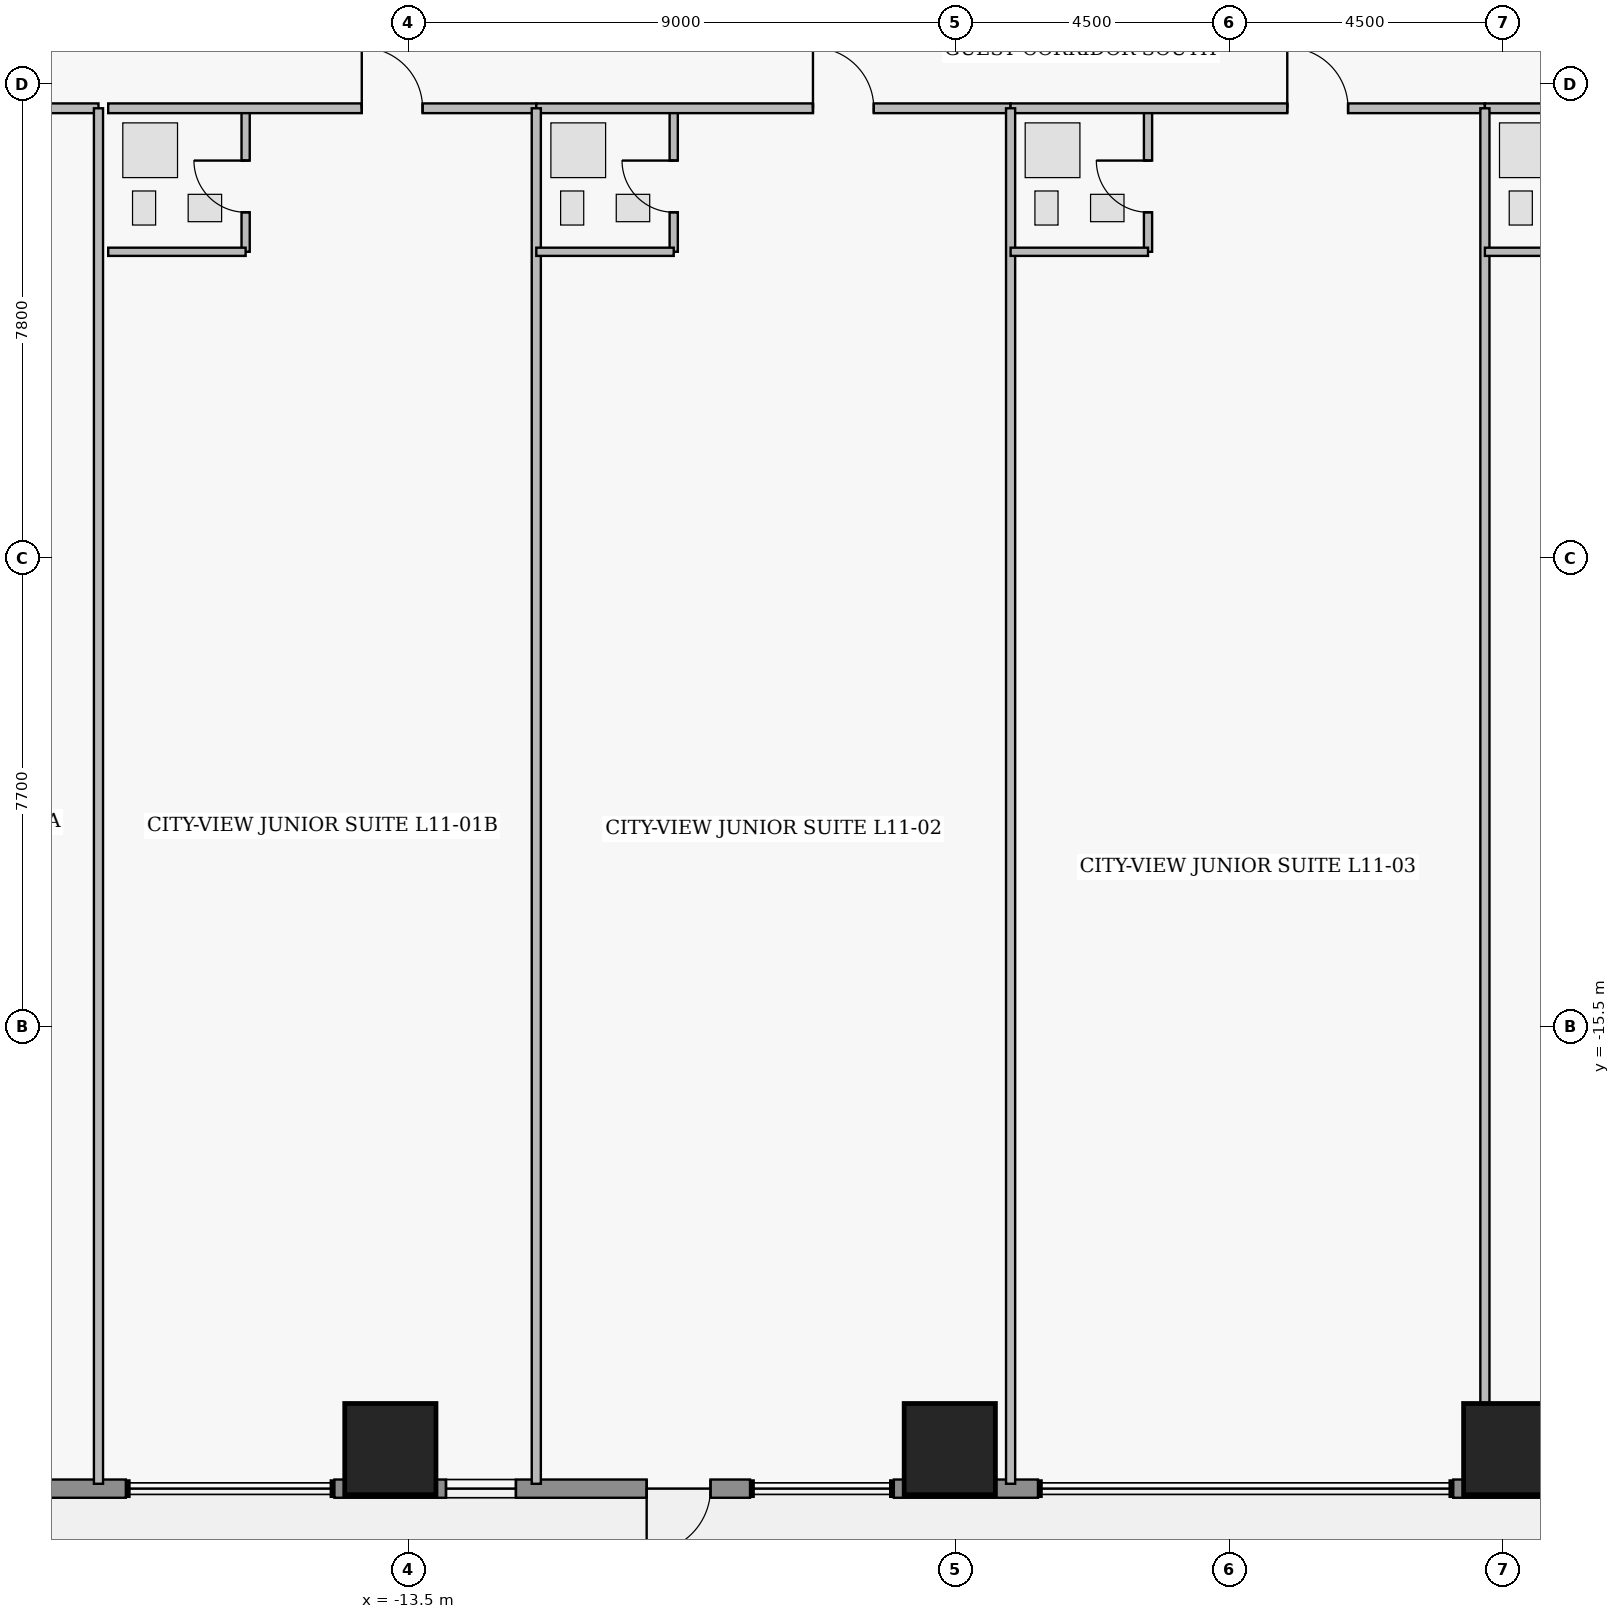
"""IFC4 building model, lengths in metres.
Left out: names, types, materials, properties, quantities, classifications, styles, units other than length and angle.
Written with IfcOpenShell. Run it as: python <this file> out.ifc"""

import sys

from ifc_helpers import new_model, si_unit, direction, frame, frame_2d, origin, origin_2d, place, context, subcontext, project, spatial, rectangle, extrude, element, fill, save


model = new_model("IFC4")
c1 = context("Model", 3, precision=1e-05, world=origin(), true_north=direction((0.0, 1.0)))
c2 = subcontext(c1, "Body", "Model", "MODEL_VIEW")
j1 = project(units=[si_unit("LENGTHUNIT", "METRE"), si_unit("PLANEANGLEUNIT", "RADIAN")], contexts=[c1])
p1 = place(None, origin())
s1 = spatial("IfcSite", under=j1, at=p1, CompositionType="ELEMENT")
p2 = place(p1, origin())
s2 = spatial("IfcBuilding", under=s1, at=p2, CompositionType="ELEMENT")
p3 = place(p2, frame((0.0, 0.0, 49.5)))
s3 = spatial("IfcBuildingStorey", under=s2, at=p3, CompositionType="ELEMENT", Elevation=49.5)
for number, where, z_axis, x_axis in (
    (1, (-13.8, -22.45, 0.0), (0.0, 0.0, 1.0), (1.0, 0.0, 0.0)),
    (2, (-4.6, -22.45, 0.0), (0.0, 0.0, 1.0), (1.0, 0.0, 0.0)),
    (3, (4.6, -22.45, 0.0), (0.0, 0.0, 1.0), (1.0, 0.0, 0.0)),
):
    element("IfcColumn", number, at=place(p3, frame(where, z_axis=z_axis, x_axis=x_axis)), inside=s3, PredefinedType="COLUMN", context=c2, shape_type="SweptSolid", body=[
        extrude(rectangle(XDim=1.5, YDim=1.5, at=origin_2d()), origin(), (0.0, 0.0, 1.0), 3.65),
    ])
p4 = place(p3, frame((5.52, -23.1, 0.0), z_axis=(0.0, 0.0, 1.0), x_axis=(-1.0, 0.0, 0.0)))
e4 = element("IfcWall", 4, at=p4, inside=s3, PredefinedType="STANDARD", context=c2, shape_type="SweptSolid", body=[
    extrude(rectangle(XDim=1.84, YDim=0.3, at=frame_2d((0.92, 0.0))), origin(), (0.0, 0.0, 1.0), 3.43),
])
p5 = place(p3, frame((-3.15, -23.1, 0.0), z_axis=(0.0, 0.0, 1.0), x_axis=(-1.0, 0.0, 0.0)))
e5 = element("IfcWall", 5, at=p5, inside=s3, PredefinedType="STANDARD", context=c2, shape_type="SweptSolid", body=[
    extrude(rectangle(XDim=2.37, YDim=0.3, at=frame_2d((1.185, 0.0))), origin(), (0.0, 0.0, 1.0), 3.43),
])
p6 = place(p3, frame((-7.885, -23.1, 0.0), z_axis=(0.0, 0.0, 1.0), x_axis=(-1.0, 0.0, 0.0)))
e6 = element("IfcWall", 6, at=p6, inside=s3, PredefinedType="STANDARD", context=c2, shape_type="SweptSolid", body=[
    extrude(rectangle(XDim=6.835, YDim=0.3, at=frame_2d((3.417, 0.0))), origin(), (0.0, 0.0, 1.0), 3.43),
])
p7 = place(p6, frame((0.65, 0.0, 0.0)))
e7 = element("IfcOpeningElement", 7, at=p7, cuts=e6, PredefinedType="OPENING", context=c2, shape_type="SweptSolid", body=[
    extrude(rectangle(XDim=1.05, YDim=2.2, at=frame_2d((0.525, 1.1))), frame((0.0, 0.16, 0.0), z_axis=(0.0, -1.0, 0.0), x_axis=(1.0, 0.0, 0.0)), (0.0, 0.0, 1.0), 0.32),
])
p8 = place(p6, frame((3.85, 0.0, 0.95)))
e8 = element("IfcOpeningElement", 8, at=p8, cuts=e6, PredefinedType="OPENING", context=c2, shape_type="SweptSolid", body=[
    extrude(rectangle(XDim=1.15, YDim=1.55, at=frame_2d((0.575, 0.775))), frame((0.0, 0.16, 0.0), z_axis=(0.0, -1.0, 0.0), x_axis=(1.0, 0.0, 0.0)), (0.0, 0.0, 1.0), 0.32),
])
p9 = place(p3, frame((-18.15, -23.1, 0.0), z_axis=(0.0, 0.0, 1.0), x_axis=(-1.0, 0.0, 0.0)))
e9 = element("IfcWall", 9, at=p9, inside=s3, PredefinedType="STANDARD", context=c2, shape_type="SweptSolid", body=[
    extrude(rectangle(XDim=3.95, YDim=0.3, at=frame_2d((1.975, 0.0))), origin(), (0.0, 0.0, 1.0), 3.43),
])
p10 = place(p9, frame((1.34, 0.0, 0.85)))
e10 = element("IfcOpeningElement", 10, at=p10, cuts=e9, PredefinedType="OPENING", context=c2, shape_type="SweptSolid", body=[
    extrude(rectangle(XDim=1.6, YDim=1.8, at=frame_2d((0.8, 0.9))), frame((0.0, 0.16, 0.0), z_axis=(0.0, -1.0, 0.0), x_axis=(1.0, 0.0, 0.0)), (0.0, 0.0, 1.0), 0.32),
])
p11 = place(p3, frame((-25.64, -0.4, 0.0), z_axis=(0.0, 0.0, 1.0), x_axis=(1.0, 0.0, 0.0)))
e11 = element("IfcWall", 11, at=p11, inside=s3, PredefinedType="PARTITIONING", context=c2, shape_type="SweptSolid", body=[
    extrude(rectangle(XDim=7.04, YDim=0.16, at=frame_2d((3.52, 0.0))), origin(), (0.0, 0.0, 1.0), 3.43),
])
p12 = place(p11, frame((4.17, 0.0, 0.0)))
e12 = element("IfcOpeningElement", 12, at=p12, cuts=e11, PredefinedType="OPENING", context=c2, shape_type="SweptSolid", body=[
    extrude(rectangle(XDim=1.0, YDim=2.15, at=frame_2d((0.5, 1.075))), frame((0.0, 0.09, 0.0), z_axis=(0.0, -1.0, 0.0), x_axis=(1.0, 0.0, 0.0)), (0.0, 0.0, 1.0), 0.18),
])
p13 = place(p3, frame((-16.18, -2.76, 0.0), z_axis=(0.0, 0.0, 1.0), x_axis=(0.0, 1.0, 0.0)))
e13 = element("IfcWall", 13, at=p13, inside=s3, PredefinedType="PLUMBINGWALL", context=c2, shape_type="SweptSolid", body=[
    extrude(rectangle(XDim=2.36, YDim=0.135, at=frame_2d((1.18, 0.0))), origin(), (0.0, 0.0, 1.0), 3.43),
])
p14 = place(p13, frame((0.65, 0.0, 0.0)))
e14 = element("IfcOpeningElement", 14, at=p14, cuts=e13, PredefinedType="OPENING", context=c2, shape_type="SweptSolid", body=[
    extrude(rectangle(XDim=0.85, YDim=2.1, at=frame_2d((0.425, 1.05))), frame((0.0, 0.077, 0.0), z_axis=(0.0, -1.0, 0.0), x_axis=(1.0, 0.0, 0.0)), (0.0, 0.0, 1.0), 0.155),
])
p15 = place(p3, frame((-18.44, -0.4, 0.0), z_axis=(0.0, 0.0, 1.0), x_axis=(1.0, 0.0, 0.0)))
e15 = element("IfcWall", 15, at=p15, inside=s3, PredefinedType="PARTITIONING", context=c2, shape_type="SweptSolid", body=[
    extrude(rectangle(XDim=7.04, YDim=0.16, at=frame_2d((3.52, 0.0))), origin(), (0.0, 0.0, 1.0), 3.43),
])
p16 = place(p15, frame((4.17, 0.0, 0.0)))
e16 = element("IfcOpeningElement", 16, at=p16, cuts=e15, PredefinedType="OPENING", context=c2, shape_type="SweptSolid", body=[
    extrude(rectangle(XDim=1.0, YDim=2.15, at=frame_2d((0.5, 1.075))), frame((0.0, 0.09, 0.0), z_axis=(0.0, -1.0, 0.0), x_axis=(1.0, 0.0, 0.0)), (0.0, 0.0, 1.0), 0.18),
])
p17 = place(p3, frame((-9.14, -2.76, 0.0), z_axis=(0.0, 0.0, 1.0), x_axis=(0.0, 1.0, 0.0)))
e17 = element("IfcWall", 17, at=p17, inside=s3, PredefinedType="PLUMBINGWALL", context=c2, shape_type="SweptSolid", body=[
    extrude(rectangle(XDim=2.36, YDim=0.135, at=frame_2d((1.18, 0.0))), origin(), (0.0, 0.0, 1.0), 3.43),
])
p18 = place(p17, frame((0.65, 0.0, 0.0)))
e18 = element("IfcOpeningElement", 18, at=p18, cuts=e17, PredefinedType="OPENING", context=c2, shape_type="SweptSolid", body=[
    extrude(rectangle(XDim=0.85, YDim=2.1, at=frame_2d((0.425, 1.05))), frame((0.0, 0.077, 0.0), z_axis=(0.0, -1.0, 0.0), x_axis=(1.0, 0.0, 0.0)), (0.0, 0.0, 1.0), 0.155),
])
p19 = place(p3, frame((-11.4, -0.4, 0.0), z_axis=(0.0, 0.0, 1.0), x_axis=(1.0, 0.0, 0.0)))
e19 = element("IfcWall", 19, at=p19, inside=s3, PredefinedType="PARTITIONING", context=c2, shape_type="SweptSolid", body=[
    extrude(rectangle(XDim=7.8, YDim=0.16, at=frame_2d((3.9, 0.0))), origin(), (0.0, 0.0, 1.0), 3.43),
])
p20 = place(p19, frame((4.55, 0.0, 0.0)))
e20 = element("IfcOpeningElement", 20, at=p20, cuts=e19, PredefinedType="OPENING", context=c2, shape_type="SweptSolid", body=[
    extrude(rectangle(XDim=1.0, YDim=2.15, at=frame_2d((0.5, 1.075))), frame((0.0, 0.09, 0.0), z_axis=(0.0, -1.0, 0.0), x_axis=(1.0, 0.0, 0.0)), (0.0, 0.0, 1.0), 0.18),
])
p21 = place(p3, frame((-1.34, -2.76, 0.0), z_axis=(0.0, 0.0, 1.0), x_axis=(0.0, 1.0, 0.0)))
e21 = element("IfcWall", 21, at=p21, inside=s3, PredefinedType="PLUMBINGWALL", context=c2, shape_type="SweptSolid", body=[
    extrude(rectangle(XDim=2.36, YDim=0.135, at=frame_2d((1.18, 0.0))), origin(), (0.0, 0.0, 1.0), 3.43),
])
p22 = place(p21, frame((0.65, 0.0, 0.0)))
e22 = element("IfcOpeningElement", 22, at=p22, cuts=e21, PredefinedType="OPENING", context=c2, shape_type="SweptSolid", body=[
    extrude(rectangle(XDim=0.85, YDim=2.1, at=frame_2d((0.425, 1.05))), frame((0.0, 0.077, 0.0), z_axis=(0.0, -1.0, 0.0), x_axis=(1.0, 0.0, 0.0)), (0.0, 0.0, 1.0), 0.155),
])
p23 = place(p3, frame((-3.6, -0.4, 0.0), z_axis=(0.0, 0.0, 1.0), x_axis=(1.0, 0.0, 0.0)))
e23 = element("IfcWall", 23, at=p23, inside=s3, PredefinedType="PARTITIONING", context=c2, shape_type="SweptSolid", body=[
    extrude(rectangle(XDim=7.8, YDim=0.16, at=frame_2d((3.9, 0.0))), origin(), (0.0, 0.0, 1.0), 3.43),
])
p24 = place(p23, frame((4.55, 0.0, 0.0)))
e24 = element("IfcOpeningElement", 24, at=p24, cuts=e23, PredefinedType="OPENING", context=c2, shape_type="SweptSolid", body=[
    extrude(rectangle(XDim=1.0, YDim=2.15, at=frame_2d((0.5, 1.075))), frame((0.0, 0.09, 0.0), z_axis=(0.0, -1.0, 0.0), x_axis=(1.0, 0.0, 0.0)), (0.0, 0.0, 1.0), 0.18),
])
p25 = place(p3, frame((4.2, -0.4, 0.0), z_axis=(0.0, 0.0, 1.0), x_axis=(1.0, 0.0, 0.0)))
e25 = element("IfcWall", 25, at=p25, inside=s3, PredefinedType="PARTITIONING", context=c2, shape_type="SweptSolid", body=[
    extrude(rectangle(XDim=7.6, YDim=0.16, at=frame_2d((3.8, 0.0))), origin(), (0.0, 0.0, 1.0), 3.43),
])
p26 = place(p25, frame((4.45, 0.0, 0.0)))
e26 = element("IfcOpeningElement", 26, at=p26, cuts=e25, PredefinedType="OPENING", context=c2, shape_type="SweptSolid", body=[
    extrude(rectangle(XDim=1.0, YDim=2.15, at=frame_2d((0.5, 1.075))), frame((0.0, 0.09, 0.0), z_axis=(0.0, -1.0, 0.0), x_axis=(1.0, 0.0, 0.0)), (0.0, 0.0, 1.0), 0.18),
])
p27 = place(p3, frame((-18.6, -23.02, 0.0), z_axis=(0.0, 0.0, 1.0), x_axis=(0.0, 1.0, 0.0)))
e27 = element("IfcWall", 27, at=p27, inside=s3, PredefinedType="PARTITIONING", context=c2, shape_type="SweptSolid", body=[
    extrude(rectangle(XDim=22.62, YDim=0.15, at=frame_2d((11.31, 0.0))), origin(), (0.0, 0.0, 1.0), 3.43),
])
p28 = place(p3, frame((-18.44, -2.76, 0.0), z_axis=(0.0, 0.0, 1.0), x_axis=(1.0, 0.0, 0.0)))
e28 = element("IfcWall", 28, at=p28, inside=s3, PredefinedType="PLUMBINGWALL", context=c2, shape_type="SweptSolid", body=[
    extrude(rectangle(XDim=2.26, YDim=0.135, at=frame_2d((1.13, 0.0))), origin(), (0.0, 0.0, 1.0), 3.43),
])
p29 = place(p3, frame((-11.4, -23.02, 0.0), z_axis=(0.0, 0.0, 1.0), x_axis=(0.0, 1.0, 0.0)))
e29 = element("IfcWall", 29, at=p29, inside=s3, PredefinedType="PARTITIONING", context=c2, shape_type="SweptSolid", body=[
    extrude(rectangle(XDim=22.62, YDim=0.15, at=frame_2d((11.31, 0.0))), origin(), (0.0, 0.0, 1.0), 3.43),
])
p30 = place(p3, frame((-11.4, -2.76, 0.0), z_axis=(0.0, 0.0, 1.0), x_axis=(1.0, 0.0, 0.0)))
e30 = element("IfcWall", 30, at=p30, inside=s3, PredefinedType="PLUMBINGWALL", context=c2, shape_type="SweptSolid", body=[
    extrude(rectangle(XDim=2.26, YDim=0.135, at=frame_2d((1.13, 0.0))), origin(), (0.0, 0.0, 1.0), 3.43),
])
p31 = place(p3, frame((-3.6, -23.02, 0.0), z_axis=(0.0, 0.0, 1.0), x_axis=(0.0, 1.0, 0.0)))
e31 = element("IfcWall", 31, at=p31, inside=s3, PredefinedType="PARTITIONING", context=c2, shape_type="SweptSolid", body=[
    extrude(rectangle(XDim=22.62, YDim=0.15, at=frame_2d((11.31, 0.0))), origin(), (0.0, 0.0, 1.0), 3.43),
])
p32 = place(p3, frame((-3.6, -2.76, 0.0), z_axis=(0.0, 0.0, 1.0), x_axis=(1.0, 0.0, 0.0)))
e32 = element("IfcWall", 32, at=p32, inside=s3, PredefinedType="PLUMBINGWALL", context=c2, shape_type="SweptSolid", body=[
    extrude(rectangle(XDim=2.26, YDim=0.135, at=frame_2d((1.13, 0.0))), origin(), (0.0, 0.0, 1.0), 3.43),
])
p33 = place(p3, frame((4.2, -23.02, 0.0), z_axis=(0.0, 0.0, 1.0), x_axis=(0.0, 1.0, 0.0)))
e33 = element("IfcWall", 33, at=p33, inside=s3, PredefinedType="PARTITIONING", context=c2, shape_type="SweptSolid", body=[
    extrude(rectangle(XDim=22.62, YDim=0.15, at=frame_2d((11.31, 0.0))), origin(), (0.0, 0.0, 1.0), 2.668),
])
p34 = place(p3, frame((4.2, -2.76, 0.0), z_axis=(0.0, 0.0, 1.0), x_axis=(1.0, 0.0, 0.0)))
e34 = element("IfcWall", 34, at=p34, inside=s3, PredefinedType="PLUMBINGWALL", context=c2, shape_type="SweptSolid", body=[
    extrude(rectangle(XDim=2.26, YDim=0.135, at=frame_2d((1.13, 0.0))), origin(), (0.0, 0.0, 1.0), 3.43),
])
p35 = place(p7, origin())
e35 = element("IfcDoor", 35, at=p35, inside=s3, OperationType="SINGLE_SWING_RIGHT", PredefinedType="DOOR", context=c2, shape_type="SweptSolid", body=[
    extrude(rectangle(XDim=1.05, YDim=2.2, at=frame_2d((0.525, 1.1))), frame((0.0, 0.025, 0.0), z_axis=(0.0, -1.0, 0.0), x_axis=(1.0, 0.0, 0.0)), (0.0, 0.0, 1.0), 0.05),
])
fill(e7, e35)
p36 = place(p8, origin())
e36 = element("IfcWindow", 36, at=p36, inside=s3, PartitioningType="SINGLE_PANEL", PredefinedType="WINDOW", context=c2, shape_type="SweptSolid", body=[
    extrude(rectangle(XDim=1.15, YDim=1.55, at=frame_2d((0.575, 0.775))), frame((0.0, 0.03, 0.0), z_axis=(0.0, -1.0, 0.0), x_axis=(1.0, 0.0, 0.0)), (0.0, 0.0, 1.0), 0.06),
])
fill(e8, e36)
p37 = place(p14, origin())
e37 = element("IfcDoor", 37, at=p37, inside=s3, OperationType="SINGLE_SWING_RIGHT", PredefinedType="DOOR", context=c2, shape_type="SweptSolid", body=[
    extrude(rectangle(XDim=0.85, YDim=2.1, at=frame_2d((0.425, 1.05))), frame((0.0, 0.025, 0.0), z_axis=(0.0, -1.0, 0.0), x_axis=(1.0, 0.0, 0.0)), (0.0, 0.0, 1.0), 0.05),
])
fill(e14, e37)
p38 = place(p16, origin())
e38 = element("IfcDoor", 38, at=p38, inside=s3, OperationType="SINGLE_SWING_LEFT", PredefinedType="DOOR", context=c2, shape_type="SweptSolid", body=[
    extrude(rectangle(XDim=1.0, YDim=2.15, at=frame_2d((0.5, 1.075))), frame((0.0, 0.025, 0.0), z_axis=(0.0, -1.0, 0.0), x_axis=(1.0, 0.0, 0.0)), (0.0, 0.0, 1.0), 0.05),
])
fill(e16, e38)
p39 = place(p18, origin())
e39 = element("IfcDoor", 39, at=p39, inside=s3, OperationType="SINGLE_SWING_RIGHT", PredefinedType="DOOR", context=c2, shape_type="SweptSolid", body=[
    extrude(rectangle(XDim=0.85, YDim=2.1, at=frame_2d((0.425, 1.05))), frame((0.0, 0.025, 0.0), z_axis=(0.0, -1.0, 0.0), x_axis=(1.0, 0.0, 0.0)), (0.0, 0.0, 1.0), 0.05),
])
fill(e18, e39)
p40 = place(p20, origin())
e40 = element("IfcDoor", 40, at=p40, inside=s3, OperationType="SINGLE_SWING_LEFT", PredefinedType="DOOR", context=c2, shape_type="SweptSolid", body=[
    extrude(rectangle(XDim=1.0, YDim=2.15, at=frame_2d((0.5, 1.075))), frame((0.0, 0.025, 0.0), z_axis=(0.0, -1.0, 0.0), x_axis=(1.0, 0.0, 0.0)), (0.0, 0.0, 1.0), 0.05),
])
fill(e20, e40)
p41 = place(p22, origin())
e41 = element("IfcDoor", 41, at=p41, inside=s3, OperationType="SINGLE_SWING_RIGHT", PredefinedType="DOOR", context=c2, shape_type="SweptSolid", body=[
    extrude(rectangle(XDim=0.85, YDim=2.1, at=frame_2d((0.425, 1.05))), frame((0.0, 0.025, 0.0), z_axis=(0.0, -1.0, 0.0), x_axis=(1.0, 0.0, 0.0)), (0.0, 0.0, 1.0), 0.05),
])
fill(e22, e41)
p42 = place(p24, origin())
e42 = element("IfcDoor", 42, at=p42, inside=s3, OperationType="SINGLE_SWING_LEFT", PredefinedType="DOOR", context=c2, shape_type="SweptSolid", body=[
    extrude(rectangle(XDim=1.0, YDim=2.15, at=frame_2d((0.5, 1.075))), frame((0.0, 0.025, 0.0), z_axis=(0.0, -1.0, 0.0), x_axis=(1.0, 0.0, 0.0)), (0.0, 0.0, 1.0), 0.05),
])
fill(e24, e42)
save(model, sys.argv[1])
